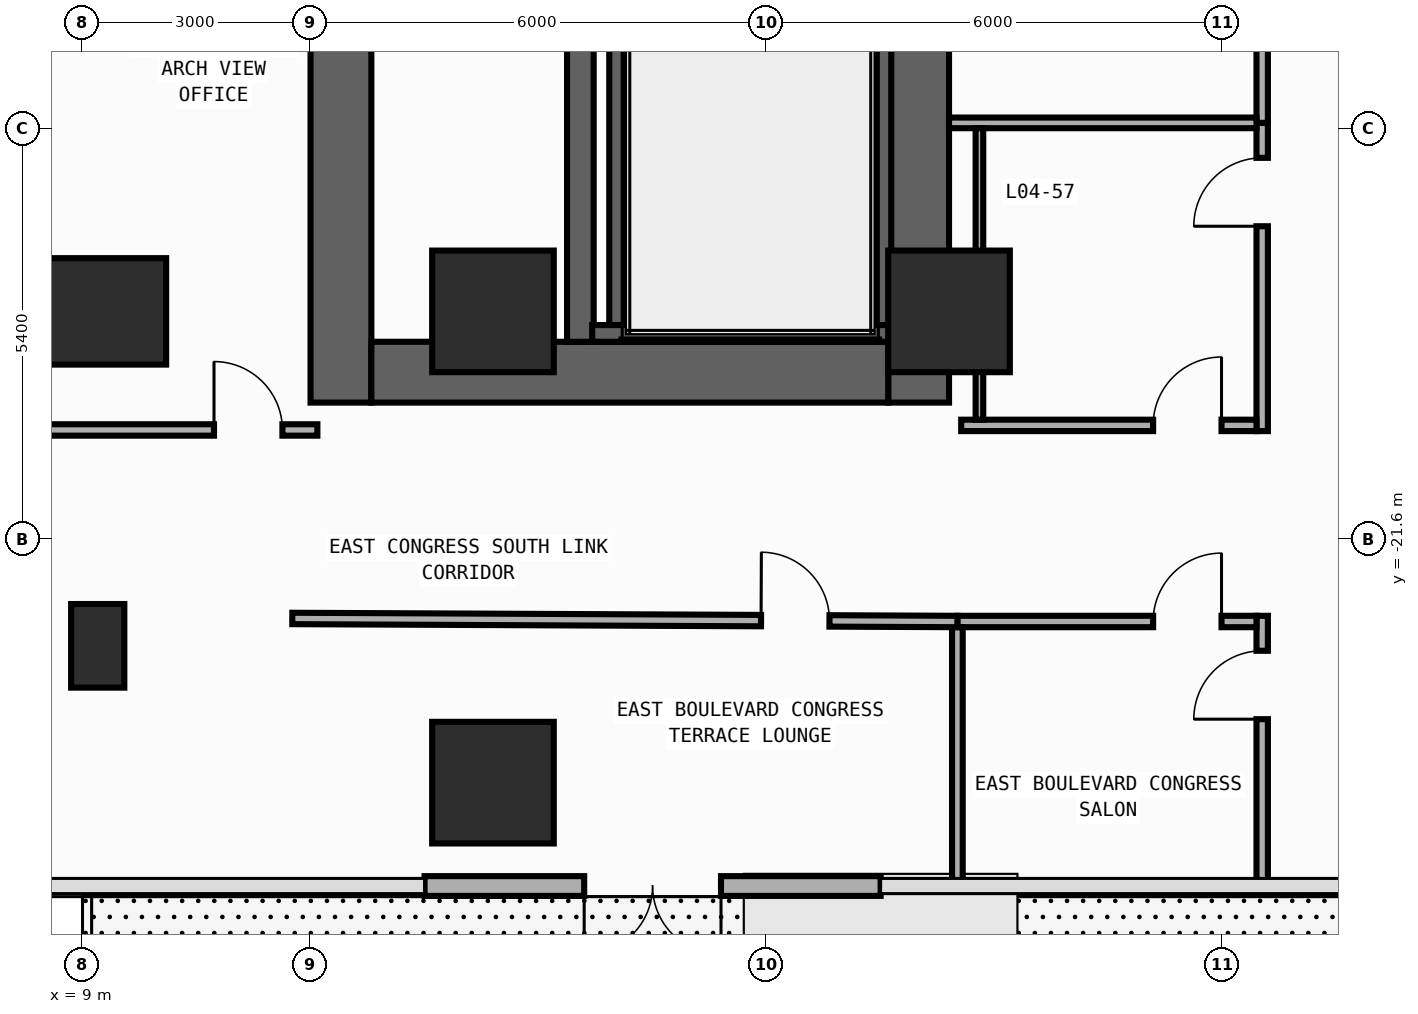
"""IFC4 building model, lengths in metres.
Left out: names, types, materials, properties, quantities, classifications, styles, units other than length and angle.
Written with IfcOpenShell. Run it as: python <this file> out.ifc"""

import sys

from ifc_helpers import new_model, si_unit, direction, frame, frame_2d, origin, origin_2d, place, context, subcontext, project, spatial, rectangle, extrude, element, fill, save


model = new_model("IFC4")
c1 = context("Model", 3, precision=1e-05, world=origin(), true_north=direction((0.0, 1.0)))
c2 = subcontext(c1, "Body", "Model", "MODEL_VIEW")
j1 = project(units=[si_unit("LENGTHUNIT", "METRE"), si_unit("PLANEANGLEUNIT", "RADIAN")], contexts=[c1])
p1 = place(None, origin())
s1 = spatial("IfcSite", under=j1, at=p1, CompositionType="ELEMENT")
p2 = place(p1, origin())
s2 = spatial("IfcBuilding", under=s1, at=p2, CompositionType="ELEMENT")
p3 = place(p2, frame((0.0, 0.0, 16.0)))
s3 = spatial("IfcBuildingStorey", under=s2, at=p3, CompositionType="ELEMENT", Elevation=16.0)
p4 = place(p3, frame((12.4, -19.8, 0.0), z_axis=(0.0, 0.0, 1.0), x_axis=(0.0, 1.0, 0.0)))
e1 = element("IfcWall", 1, at=p4, inside=s3, PredefinedType="SHEAR", context=c2, shape_type="SweptSolid", body=[
    extrude(rectangle(XDim=27.0, YDim=0.8, at=frame_2d((13.5, 0.0))), origin(), (0.0, 0.0, 1.0), 4.55),
])
p5 = place(p4, frame((23.05, 0.0, 0.0)))
e2 = element("IfcOpeningElement", 2, at=p5, cuts=e1, PredefinedType="OPENING", context=c2, shape_type="SweptSolid", body=[
    extrude(rectangle(XDim=1.1, YDim=2.2, at=frame_2d((0.55, 1.1))), frame((0.0, 0.41, 0.0), z_axis=(0.0, -1.0, 0.0), x_axis=(1.0, 0.0, 0.0)), (0.0, 0.0, 1.0), 0.82),
])
p6 = place(p4, frame((19.85, 0.0, 0.0)))
e3 = element("IfcOpeningElement", 3, at=p6, cuts=e1, PredefinedType="OPENING", context=c2, shape_type="SweptSolid", body=[
    extrude(rectangle(XDim=1.1, YDim=2.2, at=frame_2d((0.55, 1.1))), frame((0.0, 0.41, 0.0), z_axis=(0.0, -1.0, 0.0), x_axis=(1.0, 0.0, 0.0)), (0.0, 0.0, 1.0), 0.82),
])
p7 = place(p4, frame((16.65, 0.0, 0.0)))
e4 = element("IfcOpeningElement", 4, at=p7, cuts=e1, PredefinedType="OPENING", context=c2, shape_type="SweptSolid", body=[
    extrude(rectangle(XDim=1.1, YDim=2.2, at=frame_2d((0.55, 1.1))), frame((0.0, 0.41, 0.0), z_axis=(0.0, -1.0, 0.0), x_axis=(1.0, 0.0, 0.0)), (0.0, 0.0, 1.0), 0.82),
])
p8 = place(p4, frame((7.175, 0.0, 0.0)))
e5 = element("IfcOpeningElement", 5, at=p8, cuts=e1, PredefinedType="OPENING", context=c2, shape_type="SweptSolid", body=[
    extrude(rectangle(XDim=0.85, YDim=2.1, at=frame_2d((0.425, 1.05))), frame((0.0, 0.41, 0.0), z_axis=(0.0, -1.0, 0.0), x_axis=(1.0, 0.0, 0.0)), (0.0, 0.0, 1.0), 0.82),
])
p9 = place(p4, frame((10.375, 0.0, 0.0)))
e6 = element("IfcOpeningElement", 6, at=p9, cuts=e1, PredefinedType="OPENING", context=c2, shape_type="SweptSolid", body=[
    extrude(rectangle(XDim=0.85, YDim=2.1, at=frame_2d((0.425, 1.05))), frame((0.0, 0.41, 0.0), z_axis=(0.0, -1.0, 0.0), x_axis=(1.0, 0.0, 0.0)), (0.0, 0.0, 1.0), 0.82),
])
p10 = place(p4, frame((12.725, 0.0, 0.0)))
e7 = element("IfcOpeningElement", 7, at=p10, cuts=e1, PredefinedType="OPENING", context=c2, shape_type="SweptSolid", body=[
    extrude(rectangle(XDim=1.15, YDim=2.2, at=frame_2d((0.575, 1.1))), frame((0.0, 0.41, 0.0), z_axis=(0.0, -1.0, 0.0), x_axis=(1.0, 0.0, 0.0)), (0.0, 0.0, 1.0), 0.82),
])
p11 = place(p4, frame((25.125, 0.0, 0.0)))
e8 = element("IfcOpeningElement", 8, at=p11, cuts=e1, PredefinedType="OPENING", context=c2, shape_type="SweptSolid", body=[
    extrude(rectangle(XDim=0.85, YDim=2.1, at=frame_2d((0.425, 1.05))), frame((0.0, 0.41, 0.0), z_axis=(0.0, -1.0, 0.0), x_axis=(1.0, 0.0, 0.0)), (0.0, 0.0, 1.0), 0.82),
])
p12 = place(p3, frame((20.0, -19.8, 0.0), z_axis=(0.0, 0.0, 1.0), x_axis=(0.0, 1.0, 0.0)))
e9 = element("IfcWall", 9, at=p12, inside=s3, PredefinedType="SHEAR", context=c2, shape_type="SweptSolid", body=[
    extrude(rectangle(XDim=27.0, YDim=0.8, at=frame_2d((13.5, 0.0))), origin(), (0.0, 0.0, 1.0), 4.55),
])
p13 = place(p3, frame((12.8, -19.4, 0.0), z_axis=(0.0, 0.0, 1.0), x_axis=(1.0, 0.0, 0.0)))
e10 = element("IfcWall", 10, at=p13, inside=s3, PredefinedType="SHEAR", context=c2, shape_type="SweptSolid", body=[
    extrude(rectangle(XDim=6.8, YDim=0.8, at=frame_2d((3.4, 0.0))), origin(), (0.0, 0.0, 1.0), 4.55),
])
p14 = place(p3, frame((15.55, -19.0, 0.0), z_axis=(0.0, 0.0, 1.0), x_axis=(0.0, 1.0, 0.0)))
e11 = element("IfcWall", 11, at=p14, inside=s3, PredefinedType="SHEAR", context=c2, shape_type="SweptSolid", body=[
    extrude(rectangle(XDim=25.4, YDim=0.35, at=frame_2d((12.7, 0.0))), origin(), (0.0, 0.0, 1.0), 4.55),
])
p15 = place(p14, frame((11.925, 0.0, 0.0)))
e12 = element("IfcOpeningElement", 12, at=p15, cuts=e11, PredefinedType="OPENING", context=c2, shape_type="SweptSolid", body=[
    extrude(rectangle(XDim=1.15, YDim=2.2, at=frame_2d((0.575, 1.1))), frame((0.0, 0.185, 0.0), z_axis=(0.0, -1.0, 0.0), x_axis=(1.0, 0.0, 0.0)), (0.0, 0.0, 1.0), 0.37),
])
p16 = place(p14, frame((24.325, 0.0, 0.0)))
e13 = element("IfcOpeningElement", 13, at=p16, cuts=e11, PredefinedType="OPENING", context=c2, shape_type="SweptSolid", body=[
    extrude(rectangle(XDim=0.85, YDim=2.1, at=frame_2d((0.425, 1.05))), frame((0.0, 0.185, 0.0), z_axis=(0.0, -1.0, 0.0), x_axis=(1.0, 0.0, 0.0)), (0.0, 0.0, 1.0), 0.37),
])
for number, where, z_axis, x_axis in (
    (14, (16.04, -18.89, 0.0), (0.0, 0.0, 1.0), (0.0, 1.0, 0.0)),
    (15, (19.53, -18.89, 0.0), (0.0, 0.0, 1.0), (0.0, 1.0, 0.0)),
):
    element("IfcWall", number, at=place(p3, frame(where, z_axis=z_axis, x_axis=x_axis)), inside=s3, PredefinedType="SHEAR", context=c2, shape_type="SweptSolid", body=[
        extrude(rectangle(XDim=11.3, YDim=0.22, at=frame_2d((5.65, 0.0))), origin(), (0.0, 0.0, 1.0), 4.55),
    ])
p17 = place(p3, frame((15.705, -18.89, 0.0), z_axis=(0.0, 0.0, 1.0), x_axis=(1.0, 0.0, 0.0)))
e16 = element("IfcWall", 16, at=p17, inside=s3, PredefinedType="SHEAR", context=c2, shape_type="SweptSolid", body=[
    extrude(rectangle(XDim=3.915, YDim=0.22, at=frame_2d((1.958, 0.0))), origin(), (0.0, 0.0, 1.0), 4.55),
])
p18 = place(p3, frame((9.2, -18.6, 0.0), z_axis=(0.0, 0.0, 1.0), x_axis=(1.0, 0.0, 0.0)))
e17 = element("IfcColumn", 17, at=p18, inside=s3, PredefinedType="COLUMN", context=c2, shape_type="SweptSolid", body=[
    extrude(rectangle(XDim=1.8, YDim=1.4, at=origin_2d()), origin(), (0.0, 0.0, 1.0), 5.0),
])
for number, where, z_axis, x_axis in (
    (18, (20.4, -18.6, 0.0), (0.0, 0.0, 1.0), (1.0, 0.0, 0.0)),
    (19, (14.4, -18.6, 0.0), (0.0, 0.0, 1.0), (1.0, 0.0, 0.0)),
    (20, (14.4, -24.8, 0.0), (0.0, 0.0, 1.0), (1.0, 0.0, 0.0)),
):
    element("IfcColumn", number, at=place(p3, frame(where, z_axis=z_axis, x_axis=x_axis)), inside=s3, PredefinedType="COLUMN", context=c2, shape_type="SweptSolid", body=[
        extrude(rectangle(XDim=1.6, YDim=1.6, at=origin_2d()), origin(), (0.0, 0.0, 1.0), 5.0),
    ])
p19 = place(p3, frame((9.2, -23.0, 0.0), z_axis=(0.0, 0.0, 1.0), x_axis=(1.0, 0.0, 0.0)))
e21 = element("IfcColumn", 21, at=p19, inside=s3, PredefinedType="PILASTER", context=c2, shape_type="SweptSolid", body=[
    extrude(rectangle(XDim=0.7, YDim=1.1, at=origin_2d()), origin(), (0.0, 0.0, 1.0), 5.0),
])
p20 = place(p3, frame((19.5, -26.16, 0.0), z_axis=(0.0, 0.0, 1.0), x_axis=(-1.0, 0.0, 0.0)))
e22 = element("IfcWall", 22, at=p20, inside=s3, PredefinedType="STANDARD", context=c2, shape_type="SweptSolid", body=[
    extrude(rectangle(XDim=6.0, YDim=0.26, at=frame_2d((3.0, 0.0))), origin(), (0.0, 0.0, 1.0), 4.55),
])
p21 = place(p20, frame((2.1, 0.0, 0.0)))
e23 = element("IfcOpeningElement", 23, at=p21, cuts=e22, PredefinedType="OPENING", context=c2, shape_type="SweptSolid", body=[
    extrude(rectangle(XDim=1.8, YDim=2.3, at=frame_2d((0.9, 1.15))), frame((0.0, 0.14, 0.0), z_axis=(0.0, -1.0, 0.0), x_axis=(1.0, 0.0, 0.0)), (0.0, 0.0, 1.0), 0.28),
])
p22 = place(p3, frame((24.52, -26.113, 0.0), z_axis=(0.0, 0.0, 1.0), x_axis=(0.0, 1.0, 0.0)))
e24 = element("IfcWall", 24, at=p22, inside=s3, PredefinedType="PARTITIONING", context=c2, shape_type="SweptSolid", body=[
    extrude(rectangle(XDim=3.508, YDim=0.15, at=frame_2d((1.754, 0.0))), origin(), (0.0, 0.0, 1.0), 4.55),
])
p23 = place(p22, frame((2.148, 0.0, 0.0)))
e25 = element("IfcOpeningElement", 25, at=p23, cuts=e24, PredefinedType="OPENING", context=c2, shape_type="SweptSolid", body=[
    extrude(rectangle(XDim=0.9, YDim=2.15, at=frame_2d((0.45, 1.075))), frame((0.0, 0.085, 0.0), z_axis=(0.0, -1.0, 0.0), x_axis=(1.0, 0.0, 0.0)), (0.0, 0.0, 1.0), 0.17),
])
p24 = place(p3, frame((20.51, -22.68, 0.0), z_axis=(0.0, 0.0, 1.0), x_axis=(1.0, 0.0, 0.0)))
e26 = element("IfcWall", 26, at=p24, inside=s3, PredefinedType="PARTITIONING", context=c2, shape_type="SweptSolid", body=[
    extrude(rectangle(XDim=3.935, YDim=0.15, at=frame_2d((1.968, 0.0))), origin(), (0.0, 0.0, 1.0), 4.55),
])
p25 = place(p24, frame((2.575, 0.0, 0.0)))
e27 = element("IfcOpeningElement", 27, at=p25, cuts=e26, PredefinedType="OPENING", context=c2, shape_type="SweptSolid", body=[
    extrude(rectangle(XDim=0.9, YDim=2.15, at=frame_2d((0.45, 1.075))), frame((0.0, 0.085, 0.0), z_axis=(0.0, -1.0, 0.0), x_axis=(1.0, 0.0, 0.0)), (0.0, 0.0, 1.0), 0.17),
])
p26 = place(p3, frame((20.51, -26.1, 0.0), z_axis=(0.0, 0.0, 1.0), x_axis=(0.0, 1.0, 0.0)))
e28 = element("IfcWall", 28, at=p26, inside=s3, PredefinedType="PARTITIONING", context=c2, shape_type="SweptSolid", body=[
    extrude(rectangle(XDim=3.345, YDim=0.14, at=frame_2d((1.672, 0.0))), origin(), (0.0, 0.0, 1.0), 4.55),
])
p27 = place(p3, frame((24.52, -20.175, 0.0), z_axis=(0.0, 0.0, 1.0), x_axis=(0.0, 1.0, 0.0)))
e29 = element("IfcWall", 29, at=p27, inside=s3, PredefinedType="PARTITIONING", context=c2, shape_type="SweptSolid", body=[
    extrude(rectangle(XDim=4.055, YDim=0.15, at=frame_2d((2.027, 0.0))), origin(), (0.0, 0.0, 1.0), 4.55),
])
p28 = place(p27, frame((2.695, 0.0, 0.0)))
e30 = element("IfcOpeningElement", 30, at=p28, cuts=e29, PredefinedType="OPENING", context=c2, shape_type="SweptSolid", body=[
    extrude(rectangle(XDim=0.9, YDim=2.15, at=frame_2d((0.45, 1.075))), frame((0.0, 0.085, 0.0), z_axis=(0.0, -1.0, 0.0), x_axis=(1.0, 0.0, 0.0)), (0.0, 0.0, 1.0), 0.17),
])
p29 = place(p3, frame((24.52, -16.12, 0.0), z_axis=(0.0, 0.0, 1.0), x_axis=(0.0, 1.0, 0.0)))
e31 = element("IfcWall", 31, at=p29, inside=s3, PredefinedType="PARTITIONING", context=c2, shape_type="SweptSolid", body=[
    extrude(rectangle(XDim=23.58, YDim=0.15, at=frame_2d((11.79, 0.0))), origin(), (0.0, 0.0, 1.0), 4.55),
])
p30 = place(p29, frame((10.333, 0.0, 0.0)))
e32 = element("IfcOpeningElement", 32, at=p30, cuts=e31, PredefinedType="OPENING", context=c2, shape_type="SweptSolid", body=[
    extrude(rectangle(XDim=0.9, YDim=2.15, at=frame_2d((0.45, 1.075))), frame((0.0, 0.085, 0.0), z_axis=(0.0, -1.0, 0.0), x_axis=(1.0, 0.0, 0.0)), (0.0, 0.0, 1.0), 0.17),
])
p31 = place(p3, frame((11.76, -22.64, 0.0), z_axis=(0.0, 0.0, 1.0), x_axis=(0.999989530767, -0.004575844951, 0.0)))
e33 = element("IfcWall", 33, at=p31, inside=s3, PredefinedType="PARTITIONING", context=c2, shape_type="SweptSolid", body=[
    extrude(rectangle(XDim=8.75, YDim=0.15, at=frame_2d((4.375, 0.0))), origin(), (0.0, 0.0, 1.0), 4.55),
])
p32 = place(p31, frame((6.167, 0.0, 0.0)))
e34 = element("IfcOpeningElement", 34, at=p32, cuts=e33, PredefinedType="OPENING", context=c2, shape_type="SweptSolid", body=[
    extrude(rectangle(XDim=0.9, YDim=2.15, at=frame_2d((0.45, 1.075))), frame((0.0, 0.085, 0.0), z_axis=(0.0, -1.0, 0.0), x_axis=(1.0, 0.0, 0.0)), (0.0, 0.0, 1.0), 0.17),
])
p33 = place(p3, frame((20.56, -20.1, 0.0), z_axis=(0.0, 0.0, 1.0), x_axis=(1.0, 0.0, 0.0)))
e35 = element("IfcWall", 35, at=p33, inside=s3, PredefinedType="PARTITIONING", context=c2, shape_type="SweptSolid", body=[
    extrude(rectangle(XDim=3.885, YDim=0.15, at=frame_2d((1.942, 0.0))), origin(), (0.0, 0.0, 1.0), 4.55),
])
p34 = place(p33, frame((2.525, 0.0, 0.0)))
e36 = element("IfcOpeningElement", 36, at=p34, cuts=e35, PredefinedType="OPENING", context=c2, shape_type="SweptSolid", body=[
    extrude(rectangle(XDim=0.9, YDim=2.15, at=frame_2d((0.45, 1.075))), frame((0.0, 0.085, 0.0), z_axis=(0.0, -1.0, 0.0), x_axis=(1.0, 0.0, 0.0)), (0.0, 0.0, 1.0), 0.17),
])
p35 = place(p3, frame((8.205, -20.16, 0.0), z_axis=(0.0, 0.0, 1.0), x_axis=(1.0, 0.0, 0.0)))
e37 = element("IfcWall", 37, at=p35, inside=s3, PredefinedType="PARTITIONING", context=c2, shape_type="SweptSolid", body=[
    extrude(rectangle(XDim=3.885, YDim=0.15, at=frame_2d((1.942, 0.0))), origin(), (0.0, 0.0, 1.0), 4.55),
])
p36 = place(p35, frame((2.525, 0.0, 0.0)))
e38 = element("IfcOpeningElement", 38, at=p36, cuts=e37, PredefinedType="OPENING", context=c2, shape_type="SweptSolid", body=[
    extrude(rectangle(XDim=0.9, YDim=2.15, at=frame_2d((0.45, 1.075))), frame((0.0, 0.085, 0.0), z_axis=(0.0, -1.0, 0.0), x_axis=(1.0, 0.0, 0.0)), (0.0, 0.0, 1.0), 0.17),
])
p37 = place(p3, frame((20.4, -16.12, 0.0), z_axis=(0.0, 0.0, 1.0), x_axis=(1.0, 0.0, 0.0)))
e39 = element("IfcWall", 39, at=p37, inside=s3, PredefinedType="PARTITIONING", context=c2, shape_type="SweptSolid", body=[
    extrude(rectangle(XDim=4.045, YDim=0.14, at=frame_2d((2.022, 0.0))), origin(), (0.0, 0.0, 1.0), 4.55),
])
p38 = place(p3, frame((20.8, -20.025, 0.0), z_axis=(0.0, 0.0, 1.0), x_axis=(0.0, 1.0, 0.0)))
e40 = element("IfcWall", 40, at=p38, inside=s3, PredefinedType="PARTITIONING", context=c2, shape_type="SweptSolid", body=[
    extrude(rectangle(XDim=3.835, YDim=0.1, at=frame_2d((1.917, 0.0))), origin(), (0.0, 0.0, 1.0), 4.55),
])
p39 = place(p21, origin())
e41 = element("IfcDoor", 41, at=p39, inside=s3, OperationType="DOUBLE_DOOR_SINGLE_SWING", PredefinedType="DOOR", context=c2, shape_type="SweptSolid", body=[
    extrude(rectangle(XDim=1.8, YDim=2.3, at=frame_2d((0.9, 1.15))), frame((0.0, 0.025, 0.0), z_axis=(0.0, -1.0, 0.0), x_axis=(1.0, 0.0, 0.0)), (0.0, 0.0, 1.0), 0.05),
])
fill(e23, e41)
p40 = place(p23, origin())
e42 = element("IfcDoor", 42, at=p40, inside=s3, OperationType="SINGLE_SWING_LEFT", PredefinedType="DOOR", context=c2, shape_type="SweptSolid", body=[
    extrude(rectangle(XDim=0.9, YDim=2.15, at=frame_2d((0.45, 1.075))), frame((0.0, 0.025, 0.0), z_axis=(0.0, -1.0, 0.0), x_axis=(1.0, 0.0, 0.0)), (0.0, 0.0, 1.0), 0.05),
])
fill(e25, e42)
p41 = place(p25, origin())
e43 = element("IfcDoor", 43, at=p41, inside=s3, OperationType="SINGLE_SWING_RIGHT", PredefinedType="DOOR", context=c2, shape_type="SweptSolid", body=[
    extrude(rectangle(XDim=0.9, YDim=2.15, at=frame_2d((0.45, 1.075))), frame((0.0, 0.025, 0.0), z_axis=(0.0, -1.0, 0.0), x_axis=(1.0, 0.0, 0.0)), (0.0, 0.0, 1.0), 0.05),
])
fill(e27, e43)
p42 = place(p28, origin())
e44 = element("IfcDoor", 44, at=p42, inside=s3, OperationType="SINGLE_SWING_LEFT", PredefinedType="DOOR", context=c2, shape_type="SweptSolid", body=[
    extrude(rectangle(XDim=0.9, YDim=2.15, at=frame_2d((0.45, 1.075))), frame((0.0, 0.025, 0.0), z_axis=(0.0, -1.0, 0.0), x_axis=(1.0, 0.0, 0.0)), (0.0, 0.0, 1.0), 0.05),
])
fill(e30, e44)
p43 = place(p32, origin())
e45 = element("IfcDoor", 45, at=p43, inside=s3, OperationType="SINGLE_SWING_LEFT", PredefinedType="DOOR", context=c2, shape_type="SweptSolid", body=[
    extrude(rectangle(XDim=0.9, YDim=2.15, at=frame_2d((0.45, 1.075))), frame((0.0, 0.025, 0.0), z_axis=(0.0, -1.0, 0.0), x_axis=(1.0, 0.0, 0.0)), (0.0, 0.0, 1.0), 0.05),
])
fill(e34, e45)
p44 = place(p34, origin())
e46 = element("IfcDoor", 46, at=p44, inside=s3, OperationType="SINGLE_SWING_RIGHT", PredefinedType="DOOR", context=c2, shape_type="SweptSolid", body=[
    extrude(rectangle(XDim=0.9, YDim=2.15, at=frame_2d((0.45, 1.075))), frame((0.0, 0.025, 0.0), z_axis=(0.0, -1.0, 0.0), x_axis=(1.0, 0.0, 0.0)), (0.0, 0.0, 1.0), 0.05),
])
fill(e36, e46)
p45 = place(p36, origin())
e47 = element("IfcDoor", 47, at=p45, inside=s3, OperationType="SINGLE_SWING_LEFT", PredefinedType="DOOR", context=c2, shape_type="SweptSolid", body=[
    extrude(rectangle(XDim=0.9, YDim=2.15, at=frame_2d((0.45, 1.075))), frame((0.0, 0.025, 0.0), z_axis=(0.0, -1.0, 0.0), x_axis=(1.0, 0.0, 0.0)), (0.0, 0.0, 1.0), 0.05),
])
fill(e38, e47)
save(model, sys.argv[1])
